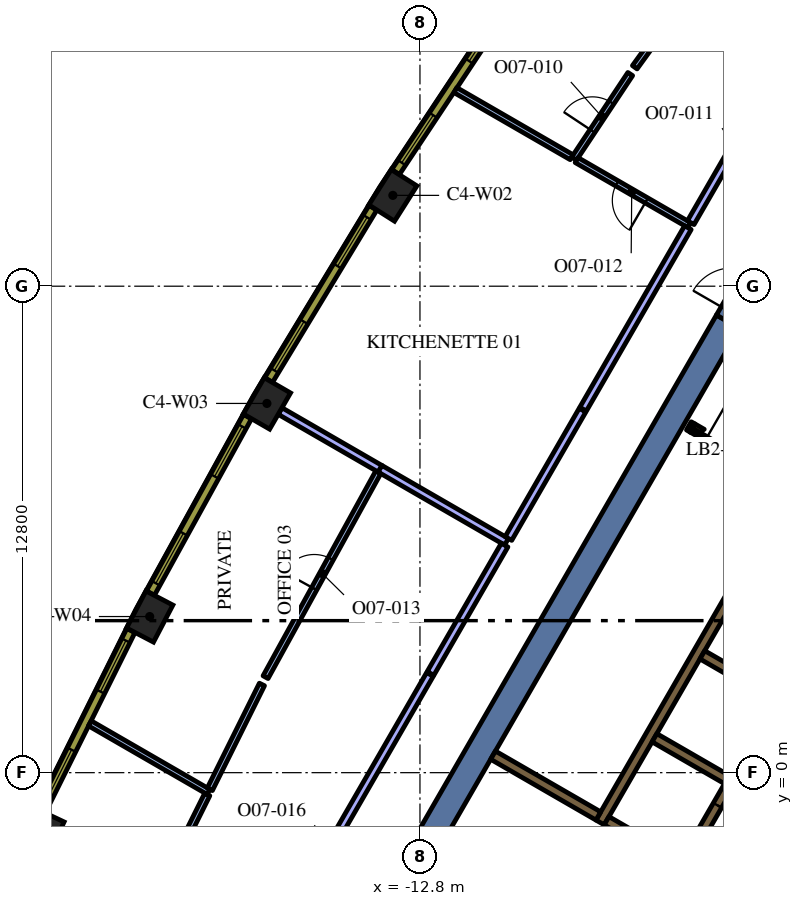
"""IFC4 building model, lengths in metres.
Left out: names, types, materials, properties, quantities, classifications, styles, units other than length and angle.
Written with IfcOpenShell. Run it as: python <this file> out.ifc"""

import sys

from ifc_helpers import new_model, si_unit, direction, frame, frame_2d, origin, origin_2d, place, context, subcontext, project, spatial, polyline, rectangle, outline, extrude, element, fill, save


model = new_model("IFC4")
c1 = context("Model", 3, precision=1e-05, world=origin(), true_north=direction((0.0, 1.0)))
c2 = subcontext(c1, "Body", "Model", "MODEL_VIEW")
j1 = project(units=[si_unit("LENGTHUNIT", "METRE"), si_unit("PLANEANGLEUNIT", "RADIAN")], contexts=[c1])
p1 = place(None, origin())
s1 = spatial("IfcSite", under=j1, at=p1, CompositionType="ELEMENT")
p2 = place(p1, origin())
s2 = spatial("IfcBuilding", under=s1, at=p2, CompositionType="ELEMENT")
p3 = place(p2, frame((0.0, 0.0, 218.4)))
s3 = spatial("IfcBuildingStorey", under=s2, at=p3, CompositionType="ELEMENT", Elevation=218.4)
for number, where, z_axis, x_axis in (
    (1, (-13.513, 15.19, 0.0), (0.0, 0.0, 1.0), (-0.536, -0.845, 0.0)),
    (2, (-16.827, 9.715, 0.0), (0.0, 0.0, 1.0), (-0.5, -0.866, 0.0)),
    (3, (-19.912, 4.108, 0.0), (0.0, 0.0, 1.0), (-0.464, -0.886, 0.0)),
    (4, (-22.76, -1.623, 0.0), (0.0, 0.0, 1.0), (-0.426, -0.905, 0.0)),
):
    element("IfcColumn", number, at=place(p3, frame(where, z_axis=z_axis, x_axis=x_axis)), inside=s3, PredefinedType="COLUMN", context=c2, shape_type="SweptSolid", body=[
        extrude(rectangle(XDim=1.1, YDim=0.8, at=origin_2d()), origin(), (0.0, 0.0, 1.0), 4.2),
    ])
p4 = place(p3, frame((-12.625, -1.867, 0.0), z_axis=(0.0, 0.0, 1.0), x_axis=(0.500008520515, 0.866020484407, 0.0)))
e5 = element("IfcWall", 5, at=p4, inside=s3, PredefinedType="SOLIDWALL", context=c2, shape_type="SweptSolid", body=[
    extrude(rectangle(XDim=15.859, YDim=0.7, at=frame_2d((7.929, 0.0))), origin(), (0.0, 0.0, 1.0), 4.2),
])
p5 = place(p3, frame((-8.06, -1.311, 0.0), z_axis=(0.0, 0.0, 1.0), x_axis=(0.50000273126, 0.866023826885, 0.0)))
e6 = element("IfcWall", 6, at=p5, inside=s3, PredefinedType="SOLIDWALL", context=c2, shape_type="SweptSolid", body=[
    extrude(rectangle(XDim=10.33, YDim=0.25, at=frame_2d((5.165, 0.0))), origin(), (0.0, 0.0, 1.0), 4.2),
])
for number, where, z_axis, x_axis in (
    (7, (-5.369, 3.1, 0.0), (0.0, 0.0, 1.0), (0.866, -0.5, 0.0)),
    (8, (-4.724, -0.182, 0.0), (0.0, 0.0, 1.0), (-0.866, 0.5, 0.0)),
):
    element("IfcWall", number, at=place(p3, frame(where, z_axis=z_axis, x_axis=x_axis)), inside=s3, PredefinedType="SOLIDWALL", context=c2, shape_type="SweptSolid", body=[
        extrude(rectangle(XDim=2.2, YDim=0.25, at=frame_2d((1.1, 0.0))), origin(), (0.0, 0.0, 1.0), 4.2),
    ])
p6 = place(p3, frame((-7.889, -1.265, 0.0), z_axis=(0.0, 0.0, 1.0), x_axis=(0.865986741702, -0.500066958712, 0.0)))
e9 = element("IfcWall", 9, at=p6, inside=s3, PredefinedType="SOLIDWALL", context=c2, shape_type="SweptSolid", body=[
    extrude(rectangle(XDim=1.738, YDim=0.25, at=frame_2d((0.869, 0.0))), origin(), (0.0, 0.0, 1.0), 4.2),
])
p7 = place(p3, frame((-8.106, -1.14, 0.0), z_axis=(0.0, 0.0, 1.0), x_axis=(-0.866008981251, 0.500028443584, 0.0)))
e10 = element("IfcWall", 10, at=p7, inside=s3, PredefinedType="SOLIDWALL", context=c2, shape_type="SweptSolid", body=[
    extrude(rectangle(XDim=3.2, YDim=0.25, at=frame_2d((1.6, 0.0))), origin(), (0.0, 0.0, 1.0), 4.2),
])
p8 = place(p3, frame((-5.725, 9.125, 0.0), z_axis=(0.0, 0.0, 1.0), x_axis=(0.866185586049, -0.49972245349, 0.0)))
e11 = element("IfcWall", 11, at=p8, inside=s3, PredefinedType="SOLIDWALL", context=c2, shape_type="SweptSolid", body=[
    extrude(rectangle(XDim=0.11, YDim=0.25, at=frame_2d((0.055, 0.0))), origin(), (0.0, 0.0, 1.0), 4.2),
])
p9 = place(p3, origin())
e12 = element("IfcWall", 12, at=p9, inside=s3, PredefinedType="SOLIDWALL", context=c2, shape_type="SweptSolid", body=[
    extrude(outline(polyline([(-5.689, 8.96), (-5.69, 8.961), (-5.565, 9.177), (-5.319, 9.035), (-5.335, 9.026), (-5.351, 9.015), (-5.366, 9.002), (-5.379, 8.988), (-5.392, 8.972), (-5.402, 8.956), (-5.412, 8.939), (-5.629, 9.064), (-5.629, 9.064), (-5.689, 8.96)])), origin(), (0.0, 0.0, 1.0), 4.2),
])
p10 = place(p3, frame((-0.898, 6.194, 0.0), z_axis=(0.0, 0.0, 1.0), x_axis=(-0.499996202215, -0.866027596426, 0.0)))
e13 = element("IfcWall", 13, at=p10, inside=s3, PredefinedType="SOLIDWALL", context=c2, shape_type="SweptSolid", body=[
    extrude(rectangle(XDim=9.83, YDim=0.25, at=frame_2d((4.915, 0.0))), origin(), (0.0, 0.0, 1.0), 4.2),
])
p11 = place(p10, frame((0.585, 0.0, 0.0)))
e14 = element("IfcOpeningElement", 14, at=p11, cuts=e13, PredefinedType="OPENING", context=c2, shape_type="SweptSolid", body=[
    extrude(rectangle(XDim=1.1, YDim=2.1, at=frame_2d((0.55, 1.05))), frame((0.0, 0.135, 0.0), z_axis=(0.0, -1.0, 0.0), x_axis=(1.0, 0.0, 0.0)), (0.0, 0.0, 1.0), 0.27),
])
p12 = place(p10, frame((3.105, 0.0, 0.0)))
e15 = element("IfcOpeningElement", 15, at=p12, cuts=e13, PredefinedType="OPENING", context=c2, shape_type="SweptSolid", body=[
    extrude(rectangle(XDim=1.1, YDim=2.1, at=frame_2d((0.55, 1.05))), frame((0.0, 0.135, 0.0), z_axis=(0.0, -1.0, 0.0), x_axis=(1.0, 0.0, 0.0)), (0.0, 0.0, 1.0), 0.27),
])
p13 = place(p10, frame((5.625, 0.0, 0.0)))
e16 = element("IfcOpeningElement", 16, at=p13, cuts=e13, PredefinedType="OPENING", context=c2, shape_type="SweptSolid", body=[
    extrude(rectangle(XDim=1.1, YDim=2.1, at=frame_2d((0.55, 1.05))), frame((0.0, 0.135, 0.0), z_axis=(0.0, -1.0, 0.0), x_axis=(1.0, 0.0, 0.0)), (0.0, 0.0, 1.0), 0.27),
])
p14 = place(p10, frame((8.145, 0.0, 0.0)))
e17 = element("IfcOpeningElement", 17, at=p14, cuts=e13, PredefinedType="OPENING", context=c2, shape_type="SweptSolid", body=[
    extrude(rectangle(XDim=1.1, YDim=2.1, at=frame_2d((0.55, 1.05))), frame((0.0, 0.135, 0.0), z_axis=(0.0, -1.0, 0.0), x_axis=(1.0, 0.0, 0.0)), (0.0, 0.0, 1.0), 0.27),
])
p15 = place(p3, frame((-5.659, 9.012, 0.0), z_axis=(0.0, 0.0, 1.0), x_axis=(0.866009402589, -0.500027713859, 0.0)))
e18 = element("IfcWall", 18, at=p15, inside=s3, PredefinedType="PARTITIONING", context=c2, shape_type="SweptSolid", body=[
    extrude(rectangle(XDim=2.1, YDim=0.12, at=frame_2d((1.05, 0.0))), origin(), (0.0, 0.0, 1.0), 3.45),
])
p16 = place(p15, frame((0.45, 0.0, 0.0)))
e19 = element("IfcOpeningElement", 19, at=p16, cuts=e18, PredefinedType="OPENING", context=c2, shape_type="SweptSolid", body=[
    extrude(rectangle(XDim=1.2, YDim=2.1, at=frame_2d((0.6, 1.05))), frame((0.0, 0.07, 0.0), z_axis=(0.0, -1.0, 0.0), x_axis=(1.0, 0.0, 0.0)), (0.0, 0.0, 1.0), 0.14),
])
p17 = place(p3, frame((-4.696, 11.867, 0.0), z_axis=(0.0, 0.0, 1.0), x_axis=(0.499892348375, 0.866087547558, 0.0)))
e20 = element("IfcWall", 20, at=p17, inside=s3, PredefinedType="SOLIDWALL", context=c2, shape_type="SweptSolid", body=[
    extrude(rectangle(XDim=1.7, YDim=0.7, at=frame_2d((0.85, 0.0))), origin(), (0.0, 0.0, 1.0), 4.2),
])
p18 = place(p17, frame((0.25, 0.0, 0.0)))
e21 = element("IfcOpeningElement", 21, at=p18, cuts=e20, PredefinedType="OPENING", context=c2, shape_type="SweptSolid", body=[
    extrude(rectangle(XDim=1.2, YDim=2.1, at=frame_2d((0.6, 1.05))), frame((0.0, 0.36, 0.0), z_axis=(0.0, -1.0, 0.0), x_axis=(1.0, 0.0, 0.0)), (0.0, 0.0, 1.0), 0.72),
])
p19 = place(p3, frame((-5.809, 20.407, 0.0), z_axis=(0.0, 0.0, 1.0), x_axis=(-0.587095604593, -0.809517603927, 0.0)))
e22 = element("IfcWall", 22, at=p19, inside=s3, PredefinedType="PARTITIONING", context=c2, shape_type="SweptSolid", body=[
    extrude(rectangle(XDim=2.281, YDim=0.15, at=frame_2d((1.141, 0.0))), origin(), (0.0, 0.0, 1.0), 3.45),
])
p20 = place(p3, frame((-8.744, 16.156, 0.0), z_axis=(0.0, 0.0, 1.0), x_axis=(0.552885218102, 0.833257424572, 0.0)))
e23 = element("IfcWall", 23, at=p20, inside=s3, PredefinedType="PARTITIONING", context=c2, shape_type="SweptSolid", body=[
    extrude(rectangle(XDim=2.672, YDim=0.15, at=frame_2d((1.336, 0.0))), origin(), (0.0, 0.0, 1.0), 3.45),
])
p21 = place(p20, frame((0.872, 0.0, 0.0)))
e24 = element("IfcOpeningElement", 24, at=p21, cuts=e23, PredefinedType="OPENING", context=c2, shape_type="SweptSolid", body=[
    extrude(rectangle(XDim=0.9, YDim=2.1, at=frame_2d((0.45, 1.05))), frame((0.0, 0.085, 0.0), z_axis=(0.0, -1.0, 0.0), x_axis=(1.0, 0.0, 0.0)), (0.0, 0.0, 1.0), 0.17),
])
p22 = place(p3, frame((-8.809, 16.194, 0.0), z_axis=(0.0, 0.0, 1.0), x_axis=(-0.865996792572, 0.500049552799, 0.0)))
e25 = element("IfcWall", 25, at=p22, inside=s3, PredefinedType="PARTITIONING", context=c2, shape_type="SweptSolid", body=[
    extrude(rectangle(XDim=3.532, YDim=0.15, at=frame_2d((1.766, 0.0))), origin(), (0.0, 0.0, 1.0), 3.45),
])
p23 = place(p3, frame((-5.712, 14.406, 0.0), z_axis=(0.0, 0.0, 1.0), x_axis=(-0.866050272892, 0.499956922968, 0.0)))
e26 = element("IfcWall", 26, at=p23, inside=s3, PredefinedType="PARTITIONING", context=c2, shape_type="SweptSolid", body=[
    extrude(rectangle(XDim=3.425, YDim=0.15, at=frame_2d((1.712, 0.0))), origin(), (0.0, 0.0, 1.0), 3.45),
])
p24 = place(p23, frame((1.3, 0.0, 0.0)))
e27 = element("IfcOpeningElement", 27, at=p24, cuts=e26, PredefinedType="OPENING", context=c2, shape_type="SweptSolid", body=[
    extrude(rectangle(XDim=0.9, YDim=2.1, at=frame_2d((0.45, 1.05))), frame((0.0, 0.085, 0.0), z_axis=(0.0, -1.0, 0.0), x_axis=(1.0, 0.0, 0.0)), (0.0, 0.0, 1.0), 0.17),
])
p25 = place(p3, frame((-3.364, 18.474, 0.0), z_axis=(0.0, 0.0, 1.0), x_axis=(-0.500007432598, -0.866021112529, 0.0)))
e28 = element("IfcWall", 28, at=p25, inside=s3, PredefinedType="PARTITIONING", context=c2, shape_type="SweptSolid", body=[
    extrude(rectangle(XDim=4.623, YDim=0.2, at=frame_2d((2.311, 0.0))), origin(), (0.0, 0.0, 1.0), 3.45),
])
p26 = place(p25, frame((1.8, 0.0, 0.0)))
e29 = element("IfcOpeningElement", 29, at=p26, cuts=e28, PredefinedType="OPENING", context=c2, shape_type="SweptSolid", body=[
    extrude(rectangle(XDim=1.0, YDim=2.1, at=frame_2d((0.5, 1.05))), frame((0.0, 0.11, 0.0), z_axis=(0.0, -1.0, 0.0), x_axis=(1.0, 0.0, 0.0)), (0.0, 0.0, 1.0), 0.22),
])
p27 = place(p3, frame((-13.844, 7.993, 0.0), z_axis=(0.0, 0.0, 1.0), x_axis=(-0.866003976688, 0.500037110984, 0.0)))
e30 = element("IfcWall", 30, at=p27, inside=s3, PredefinedType="PARTITIONING", context=c2, shape_type="SweptSolid", body=[
    extrude(rectangle(XDim=3.045, YDim=0.2, at=frame_2d((1.522, 0.0))), origin(), (0.0, 0.0, 1.0), 3.45),
])
p28 = place(p3, frame((-10.522, 6.075, 0.0), z_axis=(0.0, 0.0, 1.0), x_axis=(-0.866002601515, 0.500039492609, 0.0)))
e31 = element("IfcWall", 31, at=p28, inside=s3, PredefinedType="PARTITIONING", context=c2, shape_type="SweptSolid", body=[
    extrude(rectangle(XDim=3.844, YDim=0.2, at=frame_2d((1.922, 0.0))), origin(), (0.0, 0.0, 1.0), 3.45),
])
p29 = place(p3, frame((-8.522, 9.539, 0.0), z_axis=(0.0, 0.0, 1.0), x_axis=(-0.499997012787, -0.866027128446, 0.0)))
e32 = element("IfcWall", 32, at=p29, inside=s3, PredefinedType="PARTITIONING", context=c2, shape_type="SweptSolid", body=[
    extrude(rectangle(XDim=3.9, YDim=0.2, at=frame_2d((1.95, 0.0))), origin(), (0.0, 0.0, 1.0), 3.45),
])
p30 = place(p3, frame((-5.75, 14.341, 0.0), z_axis=(0.0, 0.0, 1.0), x_axis=(-0.499995817524, -0.866027818524, 0.0)))
e33 = element("IfcWall", 33, at=p30, inside=s3, PredefinedType="PARTITIONING", context=c2, shape_type="SweptSolid", body=[
    extrude(rectangle(XDim=5.515, YDim=0.2, at=frame_2d((2.757, 0.0))), origin(), (0.0, 0.0, 1.0), 3.45),
])
p31 = place(p3, frame((-18.363, -0.506, 0.0), z_axis=(0.0, 0.0, 1.0), x_axis=(-0.866048087663, 0.499960708312, 0.0)))
e34 = element("IfcWall", 34, at=p31, inside=s3, PredefinedType="PARTITIONING", context=c2, shape_type="SweptSolid", body=[
    extrude(rectangle(XDim=3.607, YDim=0.15, at=frame_2d((1.804, 0.0))), origin(), (0.0, 0.0, 1.0), 3.45),
])
p32 = place(p3, frame((-16.863, 2.513, 0.0), z_axis=(0.0, 0.0, 1.0), x_axis=(0.48192483879, 0.876212559689, 0.0)))
e35 = element("IfcWall", 35, at=p32, inside=s3, PredefinedType="PARTITIONING", context=c2, shape_type="SweptSolid", body=[
    extrude(rectangle(XDim=6.157, YDim=0.15, at=frame_2d((3.078, 0.0))), origin(), (0.0, 0.0, 1.0), 3.45),
])
p33 = place(p32, frame((2.657, 0.0, 0.0)))
e36 = element("IfcOpeningElement", 36, at=p33, cuts=e35, PredefinedType="OPENING", context=c2, shape_type="SweptSolid", body=[
    extrude(rectangle(XDim=0.9, YDim=2.1, at=frame_2d((0.45, 1.05))), frame((0.0, 0.085, 0.0), z_axis=(0.0, -1.0, 0.0), x_axis=(1.0, 0.0, 0.0)), (0.0, 0.0, 1.0), 0.17),
])
p34 = place(p3, frame((-16.958, 2.321, 0.0), z_axis=(0.0, 0.0, 1.0), x_axis=(-0.445184199442, -0.895439014432, 0.0)))
e37 = element("IfcWall", 37, at=p34, inside=s3, PredefinedType="PARTITIONING", context=c2, shape_type="SweptSolid", body=[
    extrude(rectangle(XDim=3.082, YDim=0.15, at=frame_2d((1.541, 0.0))), origin(), (0.0, 0.0, 1.0), 3.45),
])
p35 = place(p3, frame((-18.397, -0.573, 0.0), z_axis=(0.0, 0.0, 1.0), x_axis=(-0.445162501923, -0.89544980143, 0.0)))
e38 = element("IfcWall", 38, at=p35, inside=s3, PredefinedType="PARTITIONING", context=c2, shape_type="SweptSolid", body=[
    extrude(rectangle(XDim=2.811, YDim=0.15, at=frame_2d((1.405, 0.0))), origin(), (0.0, 0.0, 1.0), 3.45),
])
p36 = place(p3, frame((-10.572, 5.988, 0.0), z_axis=(0.0, 0.0, 1.0), x_axis=(-0.499997012787, -0.866027128446, 0.0)))
e39 = element("IfcWall", 39, at=p36, inside=s3, PredefinedType="PARTITIONING", context=c2, shape_type="SweptSolid", body=[
    extrude(rectangle(XDim=3.9, YDim=0.2, at=frame_2d((1.95, 0.0))), origin(), (0.0, 0.0, 1.0), 3.45),
])
p37 = place(p3, frame((-12.537, 2.585, 0.0), z_axis=(0.0, 0.0, 1.0), x_axis=(-0.500002393198, -0.866024022066, 0.0)))
e40 = element("IfcWall", 40, at=p37, inside=s3, PredefinedType="PARTITIONING", context=c2, shape_type="SweptSolid", body=[
    extrude(rectangle(XDim=10.317, YDim=0.2, at=frame_2d((5.159, 0.0))), origin(), (0.0, 0.0, 1.0), 3.45),
])
p38 = place(p37, frame((4.7, 0.0, 0.0)))
e41 = element("IfcOpeningElement", 41, at=p38, cuts=e40, PredefinedType="OPENING", context=c2, shape_type="SweptSolid", body=[
    extrude(rectangle(XDim=1.0, YDim=2.1, at=frame_2d((0.5, 1.05))), frame((0.0, 0.11, 0.0), z_axis=(0.0, -1.0, 0.0), x_axis=(1.0, 0.0, 0.0)), (0.0, 0.0, 1.0), 0.22),
])
p39 = place(p3, frame((-10.513, 20.218, 0.0), z_axis=(0.0, 0.0, 1.0), x_axis=(-0.552901821755, -0.833246407433, 0.0)))
e42 = element("IfcWall", 42, at=p39, inside=s3, PredefinedType="SOLIDWALL", context=c2, shape_type="SweptSolid", body=[
    extrude(rectangle(XDim=5.298, YDim=0.24, at=frame_2d((2.649, 0.0))), origin(), (0.0, 0.0, 1.0), 3.95),
])
p40 = place(p39, frame((0.294, 0.0, 0.9)))
e43 = element("IfcOpeningElement", 43, at=p40, cuts=e42, PredefinedType="OPENING", context=c2, shape_type="SweptSolid", body=[
    extrude(rectangle(XDim=1.5, YDim=2.55, at=frame_2d((0.75, 1.275))), frame((0.0, 0.13, 0.0), z_axis=(0.0, -1.0, 0.0), x_axis=(1.0, 0.0, 0.0)), (0.0, 0.0, 1.0), 0.26),
])
p41 = place(p39, frame((3.504, 0.0, 0.9)))
e44 = element("IfcOpeningElement", 44, at=p41, cuts=e42, PredefinedType="OPENING", context=c2, shape_type="SweptSolid", body=[
    extrude(rectangle(XDim=1.5, YDim=2.55, at=frame_2d((0.75, 1.275))), frame((0.0, 0.13, 0.0), z_axis=(0.0, -1.0, 0.0), x_axis=(1.0, 0.0, 0.0)), (0.0, 0.0, 1.0), 0.26),
])
p42 = place(p3, frame((-14.038, 14.864, 0.0), z_axis=(0.0, 0.0, 1.0), x_axis=(-0.517846166225, -0.855473756538, 0.0)))
e45 = element("IfcWall", 45, at=p42, inside=s3, PredefinedType="SOLIDWALL", context=c2, shape_type="SweptSolid", body=[
    extrude(rectangle(XDim=5.298, YDim=0.24, at=frame_2d((2.649, 0.0))), origin(), (0.0, 0.0, 1.0), 3.95),
])
p43 = place(p42, frame((0.294, 0.0, 0.9)))
e46 = element("IfcOpeningElement", 46, at=p43, cuts=e45, PredefinedType="OPENING", context=c2, shape_type="SweptSolid", body=[
    extrude(rectangle(XDim=1.5, YDim=2.55, at=frame_2d((0.75, 1.275))), frame((0.0, 0.13, 0.0), z_axis=(0.0, -1.0, 0.0), x_axis=(1.0, 0.0, 0.0)), (0.0, 0.0, 1.0), 0.26),
])
p44 = place(p42, frame((3.504, 0.0, 0.9)))
e47 = element("IfcOpeningElement", 47, at=p44, cuts=e45, PredefinedType="OPENING", context=c2, shape_type="SweptSolid", body=[
    extrude(rectangle(XDim=1.5, YDim=2.55, at=frame_2d((0.75, 1.275))), frame((0.0, 0.13, 0.0), z_axis=(0.0, -1.0, 0.0), x_axis=(1.0, 0.0, 0.0)), (0.0, 0.0, 1.0), 0.26),
])
p45 = place(p3, frame((-17.338, 9.368, 0.0), z_axis=(0.0, 0.0, 1.0), x_axis=(-0.481925825015, -0.876212017256, 0.0)))
e48 = element("IfcWall", 48, at=p45, inside=s3, PredefinedType="SOLIDWALL", context=c2, shape_type="SweptSolid", body=[
    extrude(rectangle(XDim=5.299, YDim=0.24, at=frame_2d((2.649, 0.0))), origin(), (0.0, 0.0, 1.0), 3.95),
])
p46 = place(p45, frame((0.295, 0.0, 0.9)))
e49 = element("IfcOpeningElement", 49, at=p46, cuts=e48, PredefinedType="OPENING", context=c2, shape_type="SweptSolid", body=[
    extrude(rectangle(XDim=1.5, YDim=2.55, at=frame_2d((0.75, 1.275))), frame((0.0, 0.13, 0.0), z_axis=(0.0, -1.0, 0.0), x_axis=(1.0, 0.0, 0.0)), (0.0, 0.0, 1.0), 0.26),
])
p47 = place(p45, frame((3.504, 0.0, 0.9)))
e50 = element("IfcOpeningElement", 50, at=p47, cuts=e48, PredefinedType="OPENING", context=c2, shape_type="SweptSolid", body=[
    extrude(rectangle(XDim=1.5, YDim=2.55, at=frame_2d((0.75, 1.275))), frame((0.0, 0.13, 0.0), z_axis=(0.0, -1.0, 0.0), x_axis=(1.0, 0.0, 0.0)), (0.0, 0.0, 1.0), 0.26),
])
p48 = place(p3, frame((-20.407, 3.74, 0.0), z_axis=(0.0, 0.0, 1.0), x_axis=(-0.445129582031, -0.895466166419, 0.0)))
e51 = element("IfcWall", 51, at=p48, inside=s3, PredefinedType="SOLIDWALL", context=c2, shape_type="SweptSolid", body=[
    extrude(rectangle(XDim=5.298, YDim=0.24, at=frame_2d((2.649, 0.0))), origin(), (0.0, 0.0, 1.0), 3.95),
])
p49 = place(p48, frame((0.295, 0.0, 0.9)))
e52 = element("IfcOpeningElement", 52, at=p49, cuts=e51, PredefinedType="OPENING", context=c2, shape_type="SweptSolid", body=[
    extrude(rectangle(XDim=1.5, YDim=2.55, at=frame_2d((0.75, 1.275))), frame((0.0, 0.13, 0.0), z_axis=(0.0, -1.0, 0.0), x_axis=(1.0, 0.0, 0.0)), (0.0, 0.0, 1.0), 0.26),
])
p50 = place(p48, frame((3.504, 0.0, 0.9)))
e53 = element("IfcOpeningElement", 53, at=p50, cuts=e51, PredefinedType="OPENING", context=c2, shape_type="SweptSolid", body=[
    extrude(rectangle(XDim=1.5, YDim=2.55, at=frame_2d((0.75, 1.275))), frame((0.0, 0.13, 0.0), z_axis=(0.0, -1.0, 0.0), x_axis=(1.0, 0.0, 0.0)), (0.0, 0.0, 1.0), 0.26),
])
p51 = place(p14, origin())
e54 = element("IfcDoor", 54, at=p51, inside=s3, OperationType="DOUBLE_DOOR_SLIDING", PredefinedType="DOOR", context=c2, shape_type="SweptSolid", body=[
    extrude(rectangle(XDim=1.1, YDim=2.1, at=frame_2d((0.55, 1.05))), frame((0.0, 0.025, 0.0), z_axis=(0.0, -1.0, 0.0), x_axis=(1.0, 0.0, 0.0)), (0.0, 0.0, 1.0), 0.05),
])
fill(e17, e54)
p52 = place(p16, origin())
e55 = element("IfcDoor", 55, at=p52, inside=s3, OperationType="SINGLE_SWING_LEFT", PredefinedType="DOOR", context=c2, shape_type="SweptSolid", body=[
    extrude(rectangle(XDim=1.2, YDim=2.1, at=frame_2d((0.6, 1.05))), frame((0.0, 0.025, 0.0), z_axis=(0.0, -1.0, 0.0), x_axis=(1.0, 0.0, 0.0)), (0.0, 0.0, 1.0), 0.05),
])
fill(e19, e55)
p53 = place(p21, origin())
e56 = element("IfcDoor", 56, at=p53, inside=s3, OperationType="SINGLE_SWING_LEFT", PredefinedType="DOOR", context=c2, shape_type="SweptSolid", body=[
    extrude(rectangle(XDim=0.9, YDim=2.1, at=frame_2d((0.45, 1.05))), frame((0.0, 0.025, 0.0), z_axis=(0.0, -1.0, 0.0), x_axis=(1.0, 0.0, 0.0)), (0.0, 0.0, 1.0), 0.05),
])
fill(e24, e56)
p54 = place(p24, origin())
e57 = element("IfcDoor", 57, at=p54, inside=s3, OperationType="SINGLE_SWING_RIGHT", PredefinedType="DOOR", context=c2, shape_type="SweptSolid", body=[
    extrude(rectangle(XDim=0.9, YDim=2.1, at=frame_2d((0.45, 1.05))), frame((0.0, 0.025, 0.0), z_axis=(0.0, -1.0, 0.0), x_axis=(1.0, 0.0, 0.0)), (0.0, 0.0, 1.0), 0.05),
])
fill(e27, e57)
p55 = place(p33, origin())
e58 = element("IfcDoor", 58, at=p55, inside=s3, OperationType="SINGLE_SWING_RIGHT", PredefinedType="DOOR", context=c2, shape_type="SweptSolid", body=[
    extrude(rectangle(XDim=0.9, YDim=2.1, at=frame_2d((0.45, 1.05))), frame((0.0, 0.025, 0.0), z_axis=(0.0, -1.0, 0.0), x_axis=(1.0, 0.0, 0.0)), (0.0, 0.0, 1.0), 0.05),
])
fill(e36, e58)
p56 = place(p40, origin())
e59 = element("IfcWindow", 59, at=p56, inside=s3, PartitioningType="SINGLE_PANEL", PredefinedType="WINDOW", context=c2, shape_type="SweptSolid", body=[
    extrude(rectangle(XDim=1.5, YDim=2.55, at=frame_2d((0.75, 1.275))), frame((0.0, 0.04, 0.0), z_axis=(0.0, -1.0, 0.0), x_axis=(1.0, 0.0, 0.0)), (0.0, 0.0, 1.0), 0.06),
])
fill(e43, e59)
p57 = place(p41, origin())
e60 = element("IfcWindow", 60, at=p57, inside=s3, PartitioningType="SINGLE_PANEL", PredefinedType="WINDOW", context=c2, shape_type="SweptSolid", body=[
    extrude(rectangle(XDim=1.5, YDim=2.55, at=frame_2d((0.75, 1.275))), frame((0.0, 0.04, 0.0), z_axis=(0.0, -1.0, 0.0), x_axis=(1.0, 0.0, 0.0)), (0.0, 0.0, 1.0), 0.06),
])
fill(e44, e60)
p58 = place(p43, origin())
e61 = element("IfcWindow", 61, at=p58, inside=s3, PartitioningType="SINGLE_PANEL", PredefinedType="WINDOW", context=c2, shape_type="SweptSolid", body=[
    extrude(rectangle(XDim=1.5, YDim=2.55, at=frame_2d((0.75, 1.275))), frame((0.0, 0.04, 0.0), z_axis=(0.0, -1.0, 0.0), x_axis=(1.0, 0.0, 0.0)), (0.0, 0.0, 1.0), 0.06),
])
fill(e46, e61)
p59 = place(p44, origin())
e62 = element("IfcWindow", 62, at=p59, inside=s3, PartitioningType="SINGLE_PANEL", PredefinedType="WINDOW", context=c2, shape_type="SweptSolid", body=[
    extrude(rectangle(XDim=1.5, YDim=2.55, at=frame_2d((0.75, 1.275))), frame((0.0, 0.04, 0.0), z_axis=(0.0, -1.0, 0.0), x_axis=(1.0, 0.0, 0.0)), (0.0, 0.0, 1.0), 0.06),
])
fill(e47, e62)
p60 = place(p46, origin())
e63 = element("IfcWindow", 63, at=p60, inside=s3, PartitioningType="SINGLE_PANEL", PredefinedType="WINDOW", context=c2, shape_type="SweptSolid", body=[
    extrude(rectangle(XDim=1.5, YDim=2.55, at=frame_2d((0.75, 1.275))), frame((0.0, 0.04, 0.0), z_axis=(0.0, -1.0, 0.0), x_axis=(1.0, 0.0, 0.0)), (0.0, 0.0, 1.0), 0.06),
])
fill(e49, e63)
p61 = place(p47, origin())
e64 = element("IfcWindow", 64, at=p61, inside=s3, PartitioningType="SINGLE_PANEL", PredefinedType="WINDOW", context=c2, shape_type="SweptSolid", body=[
    extrude(rectangle(XDim=1.5, YDim=2.55, at=frame_2d((0.75, 1.275))), frame((0.0, 0.04, 0.0), z_axis=(0.0, -1.0, 0.0), x_axis=(1.0, 0.0, 0.0)), (0.0, 0.0, 1.0), 0.06),
])
fill(e50, e64)
p62 = place(p49, origin())
e65 = element("IfcWindow", 65, at=p62, inside=s3, PartitioningType="SINGLE_PANEL", PredefinedType="WINDOW", context=c2, shape_type="SweptSolid", body=[
    extrude(rectangle(XDim=1.5, YDim=2.55, at=frame_2d((0.75, 1.275))), frame((0.0, 0.04, 0.0), z_axis=(0.0, -1.0, 0.0), x_axis=(1.0, 0.0, 0.0)), (0.0, 0.0, 1.0), 0.06),
])
fill(e52, e65)
p63 = place(p50, origin())
e66 = element("IfcWindow", 66, at=p63, inside=s3, PartitioningType="SINGLE_PANEL", PredefinedType="WINDOW", context=c2, shape_type="SweptSolid", body=[
    extrude(rectangle(XDim=1.5, YDim=2.55, at=frame_2d((0.75, 1.275))), frame((0.0, 0.04, 0.0), z_axis=(0.0, -1.0, 0.0), x_axis=(1.0, 0.0, 0.0)), (0.0, 0.0, 1.0), 0.06),
])
fill(e53, e66)
save(model, sys.argv[1])
